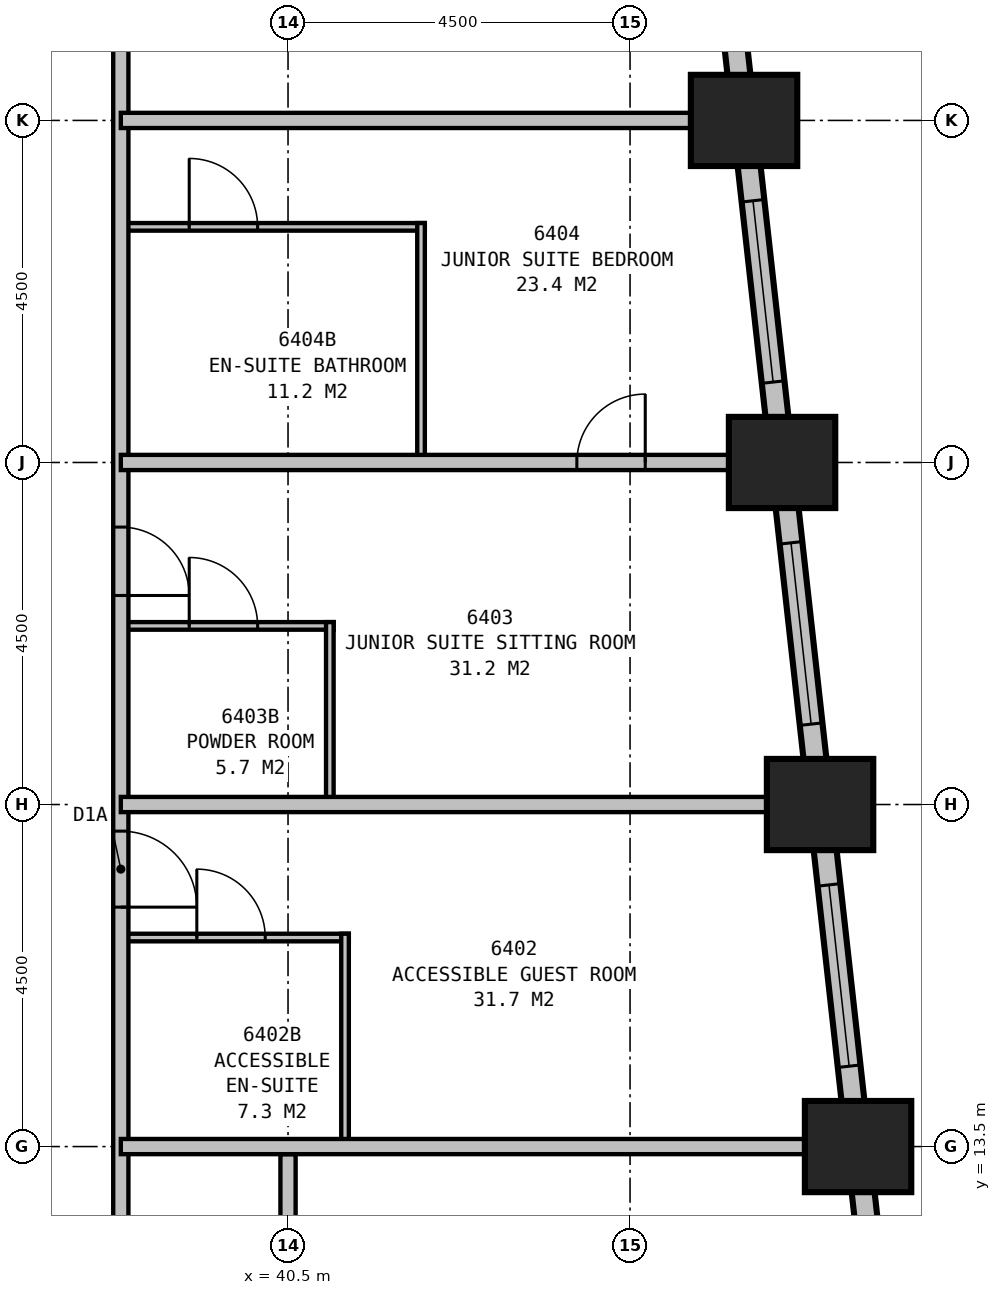
"""IFC4 building model, lengths in metres.
Left out: names, types, materials, properties, quantities, classifications, styles, units other than length and angle.
Written with IfcOpenShell. Run it as: python <this file> out.ifc"""

import sys

from ifc_helpers import new_model, si_unit, direction, frame, frame_2d, origin, origin_2d, place, context, subcontext, project, spatial, rectangle, extrude, element, fill, save


model = new_model("IFC4")
c1 = context("Model", 3, precision=1e-05, world=origin(), true_north=direction((0.0, 1.0)))
c2 = subcontext(c1, "Body", "Model", "MODEL_VIEW")
j1 = project(units=[si_unit("LENGTHUNIT", "METRE"), si_unit("PLANEANGLEUNIT", "RADIAN")], contexts=[c1])
p1 = place(None, origin())
s1 = spatial("IfcSite", under=j1, at=p1, CompositionType="ELEMENT")
p2 = place(p1, origin())
s2 = spatial("IfcBuilding", under=s1, at=p2, CompositionType="ELEMENT")
p3 = place(p2, frame((0.0, 0.0, 250.7)))
s3 = spatial("IfcBuildingStorey", under=s2, at=p3, CompositionType="ELEMENT", Elevation=250.7)
for number, where, z_axis, x_axis in (
    (1, (48.0, 13.5, 0.0), (0.0, 0.0, 1.0), (1.0, 0.0, 0.0)),
    (2, (47.5, 18.0, 0.0), (0.0, 0.0, 1.0), (1.0, 0.0, 0.0)),
    (3, (47.0, 22.5, 0.0), (0.0, 0.0, 1.0), (1.0, 0.0, 0.0)),
    (4, (46.5, 27.0, 0.0), (0.0, 0.0, 1.0), (1.0, 0.0, 0.0)),
):
    element("IfcColumn", number, at=place(p3, frame(where, z_axis=z_axis, x_axis=x_axis)), inside=s3, PredefinedType="COLUMN", context=c2, shape_type="SweptSolid", body=[
        extrude(rectangle(XDim=1.4, YDim=1.2, at=origin_2d()), origin(), (0.0, 0.0, 1.0), 3.9),
    ])
p4 = place(p3, frame((49.017, 4.351, 0.0), z_axis=(0.0, 0.0, 1.0), x_axis=(-0.110433201132, 0.993883548555, 0.0)))
e5 = element("IfcWall", 5, at=p4, inside=s3, PredefinedType="STANDARD", context=c2, shape_type="SweptSolid", body=[
    extrude(rectangle(XDim=31.994, YDim=0.3, at=frame_2d((15.997, 0.0))), origin(), (0.0, 0.0, 1.0), 2.65),
])
p5 = place(p4, frame((1.214, 0.0, 0.5)))
e6 = element("IfcOpeningElement", 6, at=p5, cuts=e5, PredefinedType="OPENING", context=c2, shape_type="SweptSolid", body=[
    extrude(rectangle(XDim=2.4, YDim=2.0, at=frame_2d((1.2, 1.0))), frame((0.0, 0.16, 0.0), z_axis=(0.0, -1.0, 0.0), x_axis=(1.0, 0.0, 0.0)), (0.0, 0.0, 1.0), 0.32),
])
p6 = place(p4, frame((5.742, 0.0, 0.5)))
e7 = element("IfcOpeningElement", 7, at=p6, cuts=e5, PredefinedType="OPENING", context=c2, shape_type="SweptSolid", body=[
    extrude(rectangle(XDim=2.4, YDim=2.0, at=frame_2d((1.2, 1.0))), frame((0.0, 0.16, 0.0), z_axis=(0.0, -1.0, 0.0), x_axis=(1.0, 0.0, 0.0)), (0.0, 0.0, 1.0), 0.32),
])
p7 = place(p4, frame((10.269, 0.0, 0.5)))
e8 = element("IfcOpeningElement", 8, at=p7, cuts=e5, PredefinedType="OPENING", context=c2, shape_type="SweptSolid", body=[
    extrude(rectangle(XDim=2.4, YDim=2.0, at=frame_2d((1.2, 1.0))), frame((0.0, 0.16, 0.0), z_axis=(0.0, -1.0, 0.0), x_axis=(1.0, 0.0, 0.0)), (0.0, 0.0, 1.0), 0.32),
])
p8 = place(p4, frame((14.797, 0.0, 0.5)))
e9 = element("IfcOpeningElement", 9, at=p8, cuts=e5, PredefinedType="OPENING", context=c2, shape_type="SweptSolid", body=[
    extrude(rectangle(XDim=2.4, YDim=2.0, at=frame_2d((1.2, 1.0))), frame((0.0, 0.16, 0.0), z_axis=(0.0, -1.0, 0.0), x_axis=(1.0, 0.0, 0.0)), (0.0, 0.0, 1.0), 0.32),
])
p9 = place(p4, frame((19.325, 0.0, 0.5)))
e10 = element("IfcOpeningElement", 10, at=p9, cuts=e5, PredefinedType="OPENING", context=c2, shape_type="SweptSolid", body=[
    extrude(rectangle(XDim=2.4, YDim=2.0, at=frame_2d((1.2, 1.0))), frame((0.0, 0.16, 0.0), z_axis=(0.0, -1.0, 0.0), x_axis=(1.0, 0.0, 0.0)), (0.0, 0.0, 1.0), 0.32),
])
p10 = place(p4, frame((23.852, 0.0, 0.5)))
e11 = element("IfcOpeningElement", 11, at=p10, cuts=e5, PredefinedType="OPENING", context=c2, shape_type="SweptSolid", body=[
    extrude(rectangle(XDim=2.4, YDim=2.0, at=frame_2d((1.2, 1.0))), frame((0.0, 0.16, 0.0), z_axis=(0.0, -1.0, 0.0), x_axis=(1.0, 0.0, 0.0)), (0.0, 0.0, 1.0), 0.32),
])
p11 = place(p4, frame((28.38, 0.0, 0.5)))
e12 = element("IfcOpeningElement", 12, at=p11, cuts=e5, PredefinedType="OPENING", context=c2, shape_type="SweptSolid", body=[
    extrude(rectangle(XDim=2.4, YDim=2.0, at=frame_2d((1.2, 1.0))), frame((0.0, 0.16, 0.0), z_axis=(0.0, -1.0, 0.0), x_axis=(1.0, 0.0, 0.0)), (0.0, 0.0, 1.0), 0.32),
])
p12 = place(p3, frame((38.3, 11.2, 0.0), z_axis=(0.0, 0.0, 1.0), x_axis=(0.0, 1.0, 0.0)))
e13 = element("IfcWall", 13, at=p12, inside=s3, PredefinedType="PARTITIONING", context=c2, shape_type="SweptSolid", body=[
    extrude(rectangle(XDim=18.7, YDim=0.2, at=frame_2d((9.35, 0.0))), origin(), (0.0, 0.0, 1.0), 3.65),
])
p13 = place(p12, frame((6.45, 0.0, 0.0), z_axis=(0.0, 0.0, 1.0), x_axis=(-1.0, 0.0, 0.0)))
e14 = element("IfcOpeningElement", 14, at=p13, cuts=e13, PredefinedType="OPENING", context=c2, shape_type="SweptSolid", body=[
    extrude(rectangle(XDim=1.0, YDim=2.1, at=frame_2d((0.5, 1.05))), frame((0.0, 0.11, 0.0), z_axis=(0.0, -1.0, 0.0), x_axis=(1.0, 0.0, 0.0)), (0.0, 0.0, 1.0), 0.22),
])
p14 = place(p12, frame((10.45, 0.0, 0.0), z_axis=(0.0, 0.0, 1.0), x_axis=(-1.0, 0.0, 0.0)))
e15 = element("IfcOpeningElement", 15, at=p14, cuts=e13, PredefinedType="OPENING", context=c2, shape_type="SweptSolid", body=[
    extrude(rectangle(XDim=0.9, YDim=2.1, at=frame_2d((0.45, 1.05))), frame((0.0, 0.11, 0.0), z_axis=(0.0, -1.0, 0.0), x_axis=(1.0, 0.0, 0.0)), (0.0, 0.0, 1.0), 0.22),
])
p15 = place(p3, frame((38.3, 18.0, 0.0), z_axis=(0.0, 0.0, 1.0), x_axis=(1.0, 0.0, 0.0)))
e16 = element("IfcWall", 16, at=p15, inside=s3, PredefinedType="PARTITIONING", context=c2, shape_type="SweptSolid", body=[
    extrude(rectangle(XDim=9.199, YDim=0.2, at=frame_2d((4.6, 0.0))), origin(), (0.0, 0.0, 1.0), 2.75),
])
p16 = place(p3, frame((38.3, 22.5, 0.0), z_axis=(0.0, 0.0, 1.0), x_axis=(1.0, 0.0, 0.0)))
e17 = element("IfcWall", 17, at=p16, inside=s3, PredefinedType="PARTITIONING", context=c2, shape_type="SweptSolid", body=[
    extrude(rectangle(XDim=8.699, YDim=0.2, at=frame_2d((4.35, 0.0))), origin(), (0.0, 0.0, 1.0), 2.75),
])
p17 = place(p16, frame((6.0, 0.0, 0.0)))
e18 = element("IfcOpeningElement", 18, at=p17, cuts=e17, PredefinedType="OPENING", context=c2, shape_type="SweptSolid", body=[
    extrude(rectangle(XDim=0.9, YDim=2.1, at=frame_2d((0.45, 1.05))), frame((0.0, 0.11, 0.0), z_axis=(0.0, -1.0, 0.0), x_axis=(1.0, 0.0, 0.0)), (0.0, 0.0, 1.0), 0.22),
])
p18 = place(p3, frame((41.25, 13.5, 0.0), z_axis=(0.0, 0.0, 1.0), x_axis=(0.0, 1.0, 0.0)))
e19 = element("IfcWall", 19, at=p18, inside=s3, PredefinedType="PLUMBINGWALL", context=c2, shape_type="SweptSolid", body=[
    extrude(rectangle(XDim=2.8, YDim=0.1, at=frame_2d((1.4, 0.0))), origin(), (0.0, 0.0, 1.0), 3.65),
])
p19 = place(p3, frame((38.3, 16.25, 0.0), z_axis=(0.0, 0.0, 1.0), x_axis=(1.0, 0.0, 0.0)))
e20 = element("IfcWall", 20, at=p19, inside=s3, PredefinedType="PLUMBINGWALL", context=c2, shape_type="SweptSolid", body=[
    extrude(rectangle(XDim=3.0, YDim=0.1, at=frame_2d((1.5, 0.0))), origin(), (0.0, 0.0, 1.0), 3.65),
])
p20 = place(p19, frame((1.0, 0.0, 0.0)))
e21 = element("IfcOpeningElement", 21, at=p20, cuts=e20, PredefinedType="OPENING", context=c2, shape_type="SweptSolid", body=[
    extrude(rectangle(XDim=0.9, YDim=2.1, at=frame_2d((0.45, 1.05))), frame((0.0, 0.06, 0.0), z_axis=(0.0, -1.0, 0.0), x_axis=(1.0, 0.0, 0.0)), (0.0, 0.0, 1.0), 0.12),
])
p21 = place(p3, frame((41.05, 18.0, 0.0), z_axis=(0.0, 0.0, 1.0), x_axis=(0.0, 1.0, 0.0)))
e22 = element("IfcWall", 22, at=p21, inside=s3, PredefinedType="PLUMBINGWALL", context=c2, shape_type="SweptSolid", body=[
    extrude(rectangle(XDim=2.4, YDim=0.1, at=frame_2d((1.2, 0.0))), origin(), (0.0, 0.0, 1.0), 3.65),
])
p22 = place(p3, frame((38.3, 20.35, 0.0), z_axis=(0.0, 0.0, 1.0), x_axis=(1.0, 0.0, 0.0)))
e23 = element("IfcWall", 23, at=p22, inside=s3, PredefinedType="PLUMBINGWALL", context=c2, shape_type="SweptSolid", body=[
    extrude(rectangle(XDim=2.8, YDim=0.1, at=frame_2d((1.4, 0.0))), origin(), (0.0, 0.0, 1.0), 3.65),
])
p23 = place(p22, frame((0.9, 0.0, 0.0)))
e24 = element("IfcOpeningElement", 24, at=p23, cuts=e23, PredefinedType="OPENING", context=c2, shape_type="SweptSolid", body=[
    extrude(rectangle(XDim=0.9, YDim=2.1, at=frame_2d((0.45, 1.05))), frame((0.0, 0.06, 0.0), z_axis=(0.0, -1.0, 0.0), x_axis=(1.0, 0.0, 0.0)), (0.0, 0.0, 1.0), 0.12),
])
p24 = place(p3, frame((42.25, 22.5, 0.0), z_axis=(0.0, 0.0, 1.0), x_axis=(0.0, 1.0, 0.0)))
e25 = element("IfcWall", 25, at=p24, inside=s3, PredefinedType="PLUMBINGWALL", context=c2, shape_type="SweptSolid", body=[
    extrude(rectangle(XDim=3.15, YDim=0.1, at=frame_2d((1.575, 0.0))), origin(), (0.0, 0.0, 1.0), 3.65),
])
p25 = place(p3, frame((38.3, 25.6, 0.0), z_axis=(0.0, 0.0, 1.0), x_axis=(1.0, 0.0, 0.0)))
e26 = element("IfcWall", 26, at=p25, inside=s3, PredefinedType="PLUMBINGWALL", context=c2, shape_type="SweptSolid", body=[
    extrude(rectangle(XDim=4.0, YDim=0.1, at=frame_2d((2.0, 0.0))), origin(), (0.0, 0.0, 1.0), 3.65),
])
p26 = place(p25, frame((0.9, 0.0, 0.0)))
e27 = element("IfcOpeningElement", 27, at=p26, cuts=e26, PredefinedType="OPENING", context=c2, shape_type="SweptSolid", body=[
    extrude(rectangle(XDim=0.9, YDim=2.1, at=frame_2d((0.45, 1.05))), frame((0.0, 0.06, 0.0), z_axis=(0.0, -1.0, 0.0), x_axis=(1.0, 0.0, 0.0)), (0.0, 0.0, 1.0), 0.12),
])
p27 = place(p3, frame((38.3, 13.5, 0.0), z_axis=(0.0, 0.0, 1.0), x_axis=(1.0, 0.0, 0.0)))
e28 = element("IfcWall", 28, at=p27, inside=s3, PredefinedType="PARTITIONING", context=c2, shape_type="SweptSolid", body=[
    extrude(rectangle(XDim=9.921, YDim=0.2, at=frame_2d((4.96, 0.0))), origin(), (0.0, 0.0, 1.0), 2.35),
])
p28 = place(p3, frame((40.5, 4.6, 0.0), z_axis=(0.0, 0.0, 1.0), x_axis=(0.0, 1.0, 0.0)))
e29 = element("IfcWall", 29, at=p28, inside=s3, PredefinedType="PARTITIONING", context=c2, shape_type="SweptSolid", body=[
    extrude(rectangle(XDim=8.8, YDim=0.2, at=frame_2d((4.4, 0.0))), origin(), (0.0, 0.0, 1.0), 2.75),
])
p29 = place(p28, frame((4.05, 0.0, 0.0)))
e30 = element("IfcOpeningElement", 30, at=p29, cuts=e29, PredefinedType="OPENING", context=c2, shape_type="SweptSolid", body=[
    extrude(rectangle(XDim=0.9, YDim=2.1, at=frame_2d((0.45, 1.05))), frame((0.0, 0.11, 0.0), z_axis=(0.0, -1.0, 0.0), x_axis=(1.0, 0.0, 0.0)), (0.0, 0.0, 1.0), 0.22),
])
p30 = place(p3, frame((38.3, 27.0, 0.0), z_axis=(0.0, 0.0, 1.0), x_axis=(1.0, 0.0, 0.0)))
e31 = element("IfcWall", 31, at=p30, inside=s3, PredefinedType="PARTITIONING", context=c2, shape_type="SweptSolid", body=[
    extrude(rectangle(XDim=7.977, YDim=0.2, at=frame_2d((3.988, 0.0))), origin(), (0.0, 0.0, 1.0), 2.35),
])
p31 = place(p7, origin())
e32 = element("IfcWindow", 32, at=p31, inside=s3, PartitioningType="SINGLE_PANEL", PredefinedType="WINDOW", context=c2, shape_type="SweptSolid", body=[
    extrude(rectangle(XDim=2.4, YDim=2.0, at=frame_2d((1.2, 1.0))), frame((0.0, 0.03, 0.0), z_axis=(0.0, -1.0, 0.0), x_axis=(1.0, 0.0, 0.0)), (0.0, 0.0, 1.0), 0.06),
])
fill(e8, e32)
p32 = place(p8, origin())
e33 = element("IfcWindow", 33, at=p32, inside=s3, PartitioningType="SINGLE_PANEL", PredefinedType="WINDOW", context=c2, shape_type="SweptSolid", body=[
    extrude(rectangle(XDim=2.4, YDim=2.0, at=frame_2d((1.2, 1.0))), frame((0.0, 0.03, 0.0), z_axis=(0.0, -1.0, 0.0), x_axis=(1.0, 0.0, 0.0)), (0.0, 0.0, 1.0), 0.06),
])
fill(e9, e33)
p33 = place(p9, origin())
e34 = element("IfcWindow", 34, at=p33, inside=s3, PartitioningType="SINGLE_PANEL", PredefinedType="WINDOW", context=c2, shape_type="SweptSolid", body=[
    extrude(rectangle(XDim=2.4, YDim=2.0, at=frame_2d((1.2, 1.0))), frame((0.0, 0.03, 0.0), z_axis=(0.0, -1.0, 0.0), x_axis=(1.0, 0.0, 0.0)), (0.0, 0.0, 1.0), 0.06),
])
fill(e10, e34)
p34 = place(p13, origin())
e35 = element("IfcDoor", 35, at=p34, inside=s3, OperationType="SINGLE_SWING_RIGHT", PredefinedType="DOOR", context=c2, shape_type="SweptSolid", body=[
    extrude(rectangle(XDim=1.0, YDim=2.1, at=frame_2d((0.5, 1.05))), frame((0.0, 0.025, 0.0), z_axis=(0.0, -1.0, 0.0), x_axis=(1.0, 0.0, 0.0)), (0.0, 0.0, 1.0), 0.05),
])
fill(e14, e35)
p35 = place(p14, origin())
e36 = element("IfcDoor", 36, at=p35, inside=s3, OperationType="SINGLE_SWING_RIGHT", PredefinedType="DOOR", context=c2, shape_type="SweptSolid", body=[
    extrude(rectangle(XDim=0.9, YDim=2.1, at=frame_2d((0.45, 1.05))), frame((0.0, 0.025, 0.0), z_axis=(0.0, -1.0, 0.0), x_axis=(1.0, 0.0, 0.0)), (0.0, 0.0, 1.0), 0.05),
])
fill(e15, e36)
p36 = place(p17, origin())
e37 = element("IfcDoor", 37, at=p36, inside=s3, OperationType="SINGLE_SWING_RIGHT", PredefinedType="DOOR", context=c2, shape_type="SweptSolid", body=[
    extrude(rectangle(XDim=0.9, YDim=2.1, at=frame_2d((0.45, 1.05))), frame((0.0, 0.025, 0.0), z_axis=(0.0, -1.0, 0.0), x_axis=(1.0, 0.0, 0.0)), (0.0, 0.0, 1.0), 0.05),
])
fill(e18, e37)
p37 = place(p20, origin())
e38 = element("IfcDoor", 38, at=p37, inside=s3, OperationType="SINGLE_SWING_LEFT", PredefinedType="DOOR", context=c2, shape_type="SweptSolid", body=[
    extrude(rectangle(XDim=0.9, YDim=2.1, at=frame_2d((0.45, 1.05))), frame((0.0, 0.025, 0.0), z_axis=(0.0, -1.0, 0.0), x_axis=(1.0, 0.0, 0.0)), (0.0, 0.0, 1.0), 0.05),
])
fill(e21, e38)
p38 = place(p23, origin())
e39 = element("IfcDoor", 39, at=p38, inside=s3, OperationType="SINGLE_SWING_LEFT", PredefinedType="DOOR", context=c2, shape_type="SweptSolid", body=[
    extrude(rectangle(XDim=0.9, YDim=2.1, at=frame_2d((0.45, 1.05))), frame((0.0, 0.025, 0.0), z_axis=(0.0, -1.0, 0.0), x_axis=(1.0, 0.0, 0.0)), (0.0, 0.0, 1.0), 0.05),
])
fill(e24, e39)
p39 = place(p26, origin())
e40 = element("IfcDoor", 40, at=p39, inside=s3, OperationType="SINGLE_SWING_LEFT", PredefinedType="DOOR", context=c2, shape_type="SweptSolid", body=[
    extrude(rectangle(XDim=0.9, YDim=2.1, at=frame_2d((0.45, 1.05))), frame((0.0, 0.025, 0.0), z_axis=(0.0, -1.0, 0.0), x_axis=(1.0, 0.0, 0.0)), (0.0, 0.0, 1.0), 0.05),
])
fill(e27, e40)
save(model, sys.argv[1])
